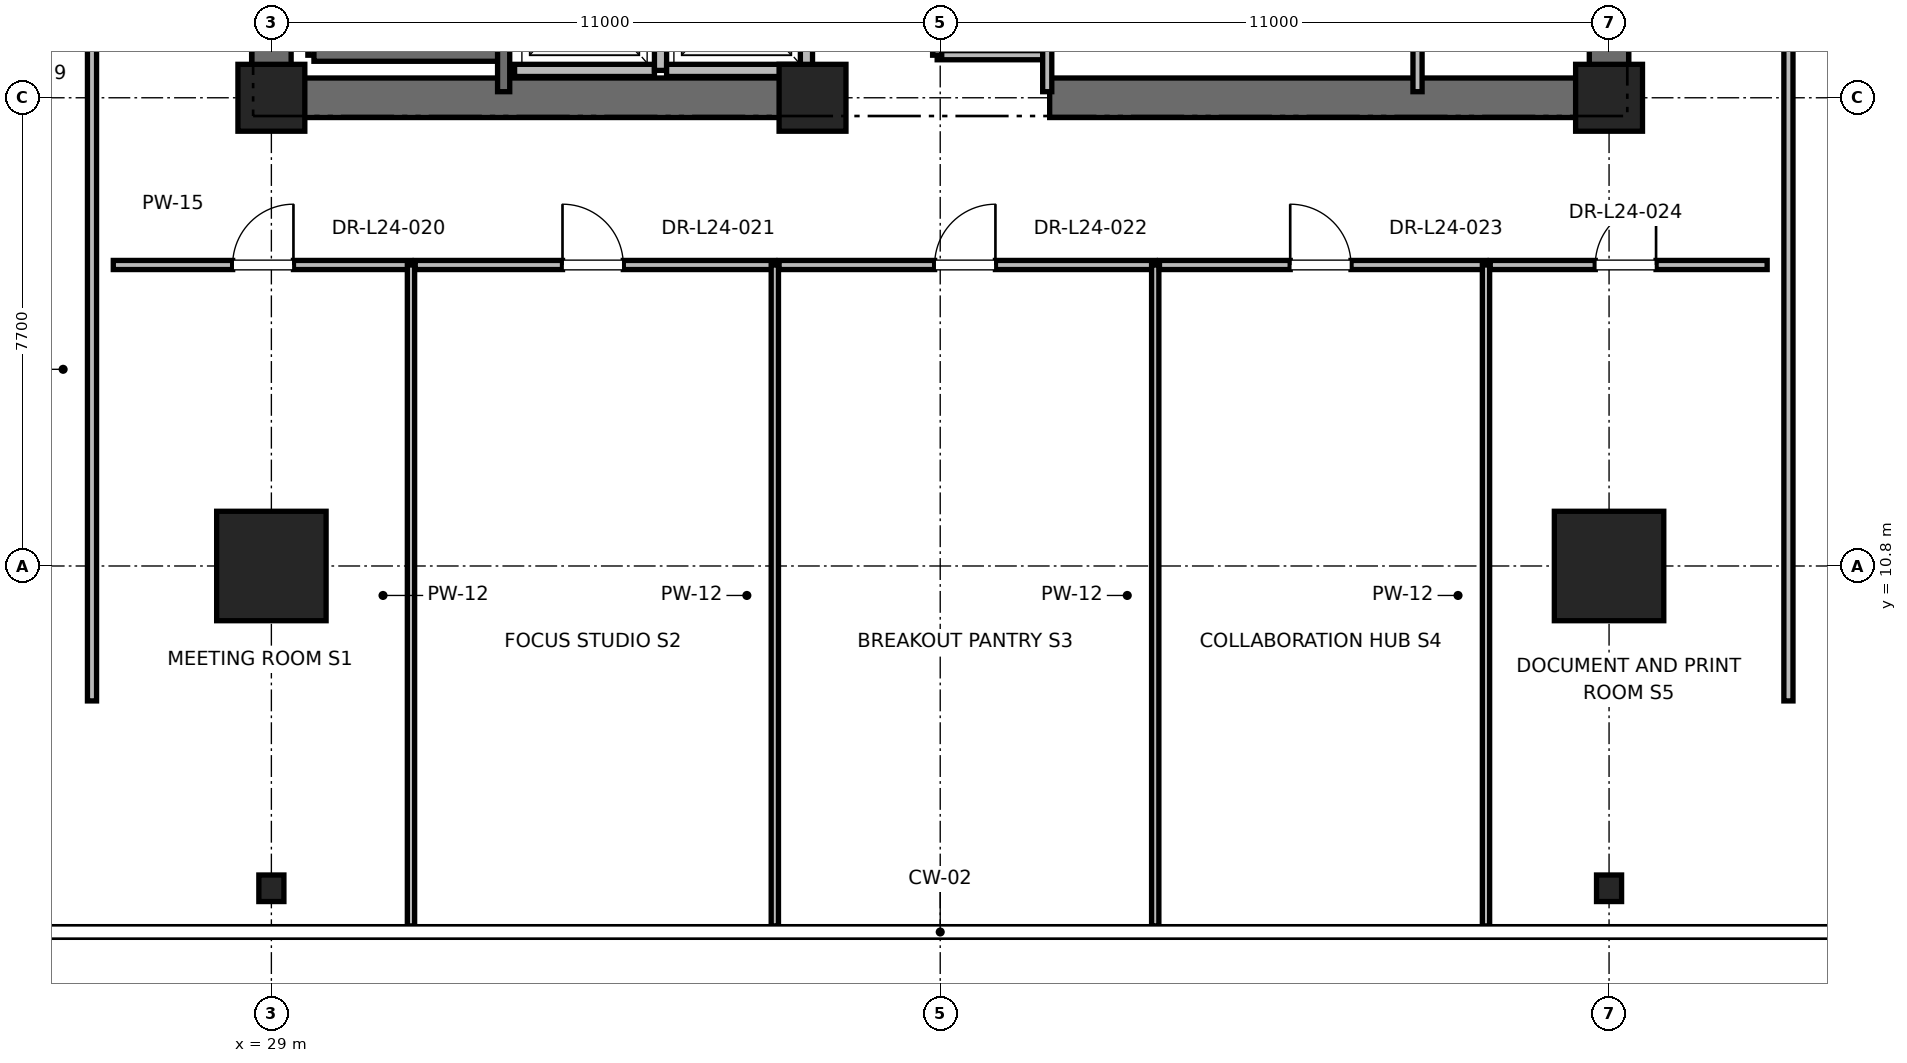
"""IFC4 building model, lengths in metres.
Left out: names, types, materials, properties, quantities, classifications, styles, units other than length and angle.
Written with IfcOpenShell. Run it as: python <this file> out.ifc"""

import sys

from ifc_helpers import new_model, si_unit, direction, frame, frame_2d, origin, origin_2d, place, context, subcontext, project, spatial, rectangle, i_section, extrude, element, fill, save


model = new_model("IFC4")
c1 = context("Model", 3, precision=1e-05, world=origin(), true_north=direction((0.0, 1.0)))
c2 = subcontext(c1, "Body", "Model", "MODEL_VIEW")
j1 = project(units=[si_unit("LENGTHUNIT", "METRE"), si_unit("PLANEANGLEUNIT", "RADIAN")], contexts=[c1])
p1 = place(None, origin())
s1 = spatial("IfcSite", under=j1, at=p1, CompositionType="ELEMENT")
p2 = place(p1, origin())
s2 = spatial("IfcBuilding", under=s1, at=p2, CompositionType="ELEMENT")
p3 = place(p2, frame((0.0, 0.0, 103.6)))
s3 = spatial("IfcBuildingStorey", under=s2, at=p3, CompositionType="ELEMENT", Elevation=103.6)
for number, where, z_axis, x_axis in (
    (1, (29.0, 10.8, 0.0), (0.0, 0.0, 1.0), (1.0, 0.0, 0.0)),
    (2, (51.0, 10.8, 0.0), (0.0, 0.0, 1.0), (1.0, 0.0, 0.0)),
):
    element("IfcColumn", number, at=place(p3, frame(where, z_axis=z_axis, x_axis=x_axis)), inside=s3, PredefinedType="COLUMN", context=c2, shape_type="SweptSolid", body=[
        extrude(rectangle(XDim=1.8, YDim=1.8, at=origin_2d()), origin(), (0.0, 0.0, 1.0), 4.0),
    ])
for number, where, z_axis, x_axis in (
    (3, (29.0, 5.5, 0.0), (0.0, 0.0, 1.0), (1.0, 0.0, 0.0)),
    (4, (51.0, 5.5, 0.0), (0.0, 0.0, 1.0), (1.0, 0.0, 0.0)),
):
    element("IfcColumn", number, at=place(p3, frame(where, z_axis=z_axis, x_axis=x_axis)), inside=s3, PredefinedType="COLUMN", context=c2, shape_type="SweptSolid", body=[
        extrude(i_section(OverallWidth=0.412, OverallDepth=0.437, WebThickness=0.036, FlangeThickness=0.058, FilletRadius=0.015, at=origin_2d()), origin(), (0.0, 0.0, 1.0), 4.0),
    ])
for number, where, z_axis, x_axis in (
    (5, (29.0, 18.5, 0.0), (0.0, 0.0, 1.0), (1.0, 0.0, 0.0)),
    (6, (51.0, 18.5, 0.0), (0.0, 0.0, 1.0), (1.0, 0.0, 0.0)),
    (7, (37.9, 18.5, 0.0), (0.0, 0.0, 1.0), (1.0, 0.0, 0.0)),
):
    element("IfcColumn", number, at=place(p3, frame(where, z_axis=z_axis, x_axis=x_axis)), inside=s3, PredefinedType="PILASTER", context=c2, shape_type="SweptSolid", body=[
        extrude(rectangle(XDim=1.1, YDim=1.1, at=origin_2d()), origin(), (0.0, 0.0, 1.0), 4.0),
    ])
for number, where, z_axis, x_axis in (
    (8, (29.0, 18.5, 0.0), (0.0, 0.0, 1.0), (1.0, 0.0, 0.0)),
    (9, (41.8, 18.5, 0.0), (0.0, 0.0, 1.0), (1.0, 0.0, 0.0)),
):
    element("IfcWall", number, at=place(p3, frame(where, z_axis=z_axis, x_axis=x_axis)), inside=s3, PredefinedType="SHEAR", context=c2, shape_type="SweptSolid", body=[
        extrude(rectangle(XDim=9.2, YDim=0.65, at=frame_2d((4.6, 0.0))), origin(), (0.0, 0.0, 1.0), 3.7),
    ])
p4 = place(p3, frame((29.0, 18.5, 0.0), z_axis=(0.0, 0.0, 1.0), x_axis=(0.0, 1.0, 0.0)))
e10 = element("IfcWall", 10, at=p4, inside=s3, PredefinedType="SHEAR", context=c2, shape_type="SweptSolid", body=[
    extrude(rectangle(XDim=8.8, YDim=0.65, at=frame_2d((4.4, 0.0))), origin(), (0.0, 0.0, 1.0), 3.7),
])
p5 = place(p3, frame((51.0, 18.5, 0.0), z_axis=(0.0, 0.0, 1.0), x_axis=(0.0, 1.0, 0.0)))
e11 = element("IfcWall", 11, at=p5, inside=s3, PredefinedType="SHEAR", context=c2, shape_type="SweptSolid", body=[
    extrude(rectangle(XDim=5.8, YDim=0.65, at=frame_2d((2.9, 0.0))), origin(), (0.0, 0.0, 1.0), 3.7),
])
p6 = place(p3, frame((29.7, 19.2, 0.0), z_axis=(0.0, 0.0, 1.0), x_axis=(0.0, 1.0, 0.0)))
e12 = element("IfcWall", 12, at=p6, inside=s3, PredefinedType="SOLIDWALL", context=c2, shape_type="SweptSolid", body=[
    extrude(rectangle(XDim=8.15, YDim=0.2, at=frame_2d((4.075, 0.0))), origin(), (0.0, 0.0, 1.0), 3.7),
])
p7 = place(p3, frame((29.7, 19.2, 0.0), z_axis=(0.0, 0.0, 1.0), x_axis=(1.0, 0.0, 0.0)))
e13 = element("IfcWall", 13, at=p7, inside=s3, PredefinedType="SOLIDWALL", context=c2, shape_type="SweptSolid", body=[
    extrude(rectangle(XDim=3.12, YDim=0.2, at=frame_2d((1.56, 0.0))), origin(), (0.0, 0.0, 1.0), 3.7),
])
p8 = place(p3, frame((32.82, 18.6, 0.0), z_axis=(0.0, 0.0, 1.0), x_axis=(0.0, 1.0, 0.0)))
e14 = element("IfcWall", 14, at=p8, inside=s3, PredefinedType="SOLIDWALL", context=c2, shape_type="SweptSolid", body=[
    extrude(rectangle(XDim=8.78, YDim=0.2, at=frame_2d((4.39, 0.0))), origin(), (0.0, 0.0, 1.0), 3.7),
])
p9 = place(p3, frame((33.0, 18.95, 0.0), z_axis=(0.0, 0.0, 1.0), x_axis=(1.0, 0.0, 0.0)))
e15 = element("IfcWall", 15, at=p9, inside=s3, PredefinedType="SOLIDWALL", context=c2, shape_type="SweptSolid", body=[
    extrude(rectangle(XDim=2.3, YDim=0.2, at=frame_2d((1.15, 0.0))), origin(), (0.0, 0.0, 1.0), 3.7),
])
p10 = place(p3, frame((35.4, 18.95, 0.0), z_axis=(0.0, 0.0, 1.0), x_axis=(0.0, 1.0, 0.0)))
e16 = element("IfcWall", 16, at=p10, inside=s3, PredefinedType="SOLIDWALL", context=c2, shape_type="SweptSolid", body=[
    extrude(rectangle(XDim=2.6, YDim=0.2, at=frame_2d((1.3, 0.0))), origin(), (0.0, 0.0, 1.0), 3.7),
])
p11 = place(p3, frame((35.5, 18.95, 0.0), z_axis=(0.0, 0.0, 1.0), x_axis=(1.0, 0.0, 0.0)))
e17 = element("IfcWall", 17, at=p11, inside=s3, PredefinedType="SOLIDWALL", context=c2, shape_type="SweptSolid", body=[
    extrude(rectangle(XDim=2.3, YDim=0.2, at=frame_2d((1.15, 0.0))), origin(), (0.0, 0.0, 1.0), 2.48),
])
p12 = place(p3, frame((37.8, 18.95, 0.0), z_axis=(0.0, 0.0, 1.0), x_axis=(0.0, 1.0, 0.0)))
e18 = element("IfcWall", 18, at=p12, inside=s3, PredefinedType="SOLIDWALL", context=c2, shape_type="SweptSolid", body=[
    extrude(rectangle(XDim=2.6, YDim=0.2, at=frame_2d((1.3, 0.0))), origin(), (0.0, 0.0, 1.0), 2.48),
])
p13 = place(p3, frame((39.95, 19.2, 0.0), z_axis=(0.0, 0.0, 1.0), x_axis=(1.0, 0.0, 0.0)))
e19 = element("IfcWall", 19, at=p13, inside=s3, PredefinedType="PARTITIONING", context=c2, shape_type="SweptSolid", body=[
    extrude(rectangle(XDim=1.81, YDim=0.15, at=frame_2d((0.905, 0.0))), origin(), (0.0, 0.0, 1.0), 2.85),
])
p14 = place(p3, frame((41.76, 18.6, 0.0), z_axis=(0.0, 0.0, 1.0), x_axis=(0.0, 1.0, 0.0)))
e20 = element("IfcWall", 20, at=p14, inside=s3, PredefinedType="PARTITIONING", context=c2, shape_type="SweptSolid", body=[
    extrude(rectangle(XDim=3.6, YDim=0.15, at=frame_2d((1.8, 0.0))), origin(), (0.0, 0.0, 1.0), 2.48),
])
p15 = place(p3, frame((39.95, 19.2, 0.0), z_axis=(0.0, 0.0, 1.0), x_axis=(0.0, 1.0, 0.0)))
e21 = element("IfcWall", 21, at=p15, inside=s3, PredefinedType="PARTITIONING", context=c2, shape_type="SweptSolid", body=[
    extrude(rectangle(XDim=3.0, YDim=0.15, at=frame_2d((1.5, 0.0))), origin(), (0.0, 0.0, 1.0), 2.85),
])
p16 = place(p15, frame((1.05, 0.0, 0.0)))
e22 = element("IfcOpeningElement", 22, at=p16, cuts=e21, PredefinedType="OPENING", context=c2, shape_type="SweptSolid", body=[
    extrude(rectangle(XDim=0.9, YDim=2.1, at=frame_2d((0.45, 1.05))), frame((0.0, 0.075, 0.0), z_axis=(0.0, -1.0, 0.0), x_axis=(1.0, 0.0, 0.0)), (0.0, 0.0, 1.0), 0.15),
])
p17 = place(p3, frame((47.85, 18.6, 0.0), z_axis=(0.0, 0.0, 1.0), x_axis=(0.0, 1.0, 0.0)))
e23 = element("IfcWall", 23, at=p17, inside=s3, PredefinedType="PARTITIONING", context=c2, shape_type="SweptSolid", body=[
    extrude(rectangle(XDim=2.54, YDim=0.15, at=frame_2d((1.27, 0.0))), origin(), (0.0, 0.0, 1.0), 2.85),
])
p18 = place(p3, frame((26.4, 15.75, 0.0), z_axis=(0.0, 0.0, 1.0), x_axis=(1.0, 0.0, 0.0)))
e24 = element("IfcWall", 24, at=p18, inside=s3, PredefinedType="PARTITIONING", context=c2, shape_type="SweptSolid", body=[
    extrude(rectangle(XDim=4.896, YDim=0.15, at=frame_2d((2.448, 0.0))), origin(), (0.0, 0.0, 1.0), 2.753),
])
p19 = place(p18, frame((1.963, 0.0, 0.0)))
e25 = element("IfcOpeningElement", 25, at=p19, cuts=e24, PredefinedType="OPENING", context=c2, shape_type="SweptSolid", body=[
    extrude(rectangle(XDim=1.0, YDim=2.15, at=frame_2d((0.5, 1.075))), frame((0.0, 0.075, 0.0), z_axis=(0.0, -1.0, 0.0), x_axis=(1.0, 0.0, 0.0)), (0.0, 0.0, 1.0), 0.15),
])
p20 = place(p3, frame((31.296, 4.881, 0.0), z_axis=(0.0, 0.0, 1.0), x_axis=(0.0, 1.0, 0.0)))
e26 = element("IfcWall", 26, at=p20, inside=s3, PredefinedType="PARTITIONING", context=c2, shape_type="SweptSolid", body=[
    extrude(rectangle(XDim=10.869, YDim=0.12, at=frame_2d((5.435, 0.0))), origin(), (0.0, 0.0, 1.0), 2.33),
])
p21 = place(p3, frame((31.366, 15.75, 0.0), z_axis=(0.0, 0.0, 1.0), x_axis=(1.0, 0.0, 0.0)))
e27 = element("IfcWall", 27, at=p21, inside=s3, PredefinedType="PARTITIONING", context=c2, shape_type="SweptSolid", body=[
    extrude(rectangle(XDim=5.914, YDim=0.15, at=frame_2d((2.957, 0.0))), origin(), (0.0, 0.0, 1.0), 2.85),
])
p22 = place(p21, frame((2.422, 0.0, 0.0)))
e28 = element("IfcOpeningElement", 28, at=p22, cuts=e27, PredefinedType="OPENING", context=c2, shape_type="SweptSolid", body=[
    extrude(rectangle(XDim=1.0, YDim=2.15, at=frame_2d((0.5, 1.075))), frame((0.0, 0.075, 0.0), z_axis=(0.0, -1.0, 0.0), x_axis=(1.0, 0.0, 0.0)), (0.0, 0.0, 1.0), 0.15),
])
p23 = place(p3, frame((37.28, 4.881, 0.0), z_axis=(0.0, 0.0, 1.0), x_axis=(0.0, 1.0, 0.0)))
e29 = element("IfcWall", 29, at=p23, inside=s3, PredefinedType="PARTITIONING", context=c2, shape_type="SweptSolid", body=[
    extrude(rectangle(XDim=10.869, YDim=0.12, at=frame_2d((5.435, 0.0))), origin(), (0.0, 0.0, 1.0), 2.33),
])
p24 = place(p3, frame((37.35, 15.75, 0.0), z_axis=(0.0, 0.0, 1.0), x_axis=(1.0, 0.0, 0.0)))
e30 = element("IfcWall", 30, at=p24, inside=s3, PredefinedType="PARTITIONING", context=c2, shape_type="SweptSolid", body=[
    extrude(rectangle(XDim=6.186, YDim=0.15, at=frame_2d((3.093, 0.0))), origin(), (0.0, 0.0, 1.0), 2.85),
])
p25 = place(p24, frame((2.558, 0.0, 0.0)))
e31 = element("IfcOpeningElement", 31, at=p25, cuts=e30, PredefinedType="OPENING", context=c2, shape_type="SweptSolid", body=[
    extrude(rectangle(XDim=1.0, YDim=2.15, at=frame_2d((0.5, 1.075))), frame((0.0, 0.075, 0.0), z_axis=(0.0, -1.0, 0.0), x_axis=(1.0, 0.0, 0.0)), (0.0, 0.0, 1.0), 0.15),
])
p26 = place(p3, frame((43.536, 4.881, 0.0), z_axis=(0.0, 0.0, 1.0), x_axis=(0.0, 1.0, 0.0)))
e32 = element("IfcWall", 32, at=p26, inside=s3, PredefinedType="PARTITIONING", context=c2, shape_type="SweptSolid", body=[
    extrude(rectangle(XDim=10.869, YDim=0.12, at=frame_2d((5.435, 0.0))), origin(), (0.0, 0.0, 1.0), 2.33),
])
p27 = place(p3, frame((43.606, 15.75, 0.0), z_axis=(0.0, 0.0, 1.0), x_axis=(1.0, 0.0, 0.0)))
e33 = element("IfcWall", 33, at=p27, inside=s3, PredefinedType="PARTITIONING", context=c2, shape_type="SweptSolid", body=[
    extrude(rectangle(XDim=5.37, YDim=0.15, at=frame_2d((2.685, 0.0))), origin(), (0.0, 0.0, 1.0), 2.85),
])
p28 = place(p27, frame((2.15, 0.0, 0.0)))
e34 = element("IfcOpeningElement", 34, at=p28, cuts=e33, PredefinedType="OPENING", context=c2, shape_type="SweptSolid", body=[
    extrude(rectangle(XDim=1.0, YDim=2.15, at=frame_2d((0.5, 1.075))), frame((0.0, 0.075, 0.0), z_axis=(0.0, -1.0, 0.0), x_axis=(1.0, 0.0, 0.0)), (0.0, 0.0, 1.0), 0.15),
])
p29 = place(p3, frame((48.976, 4.881, 0.0), z_axis=(0.0, 0.0, 1.0), x_axis=(0.0, 1.0, 0.0)))
e35 = element("IfcWall", 35, at=p29, inside=s3, PredefinedType="PARTITIONING", context=c2, shape_type="SweptSolid", body=[
    extrude(rectangle(XDim=10.869, YDim=0.12, at=frame_2d((5.435, 0.0))), origin(), (0.0, 0.0, 1.0), 2.33),
])
p30 = place(p3, frame((49.046, 15.75, 0.0), z_axis=(0.0, 0.0, 1.0), x_axis=(1.0, 0.0, 0.0)))
e36 = element("IfcWall", 36, at=p30, inside=s3, PredefinedType="PARTITIONING", context=c2, shape_type="SweptSolid", body=[
    extrude(rectangle(XDim=4.554, YDim=0.15, at=frame_2d((2.277, 0.0))), origin(), (0.0, 0.0, 1.0), 2.753),
])
p31 = place(p30, frame((1.727, 0.0, 0.0)))
e37 = element("IfcOpeningElement", 37, at=p31, cuts=e36, PredefinedType="OPENING", context=c2, shape_type="SweptSolid", body=[
    extrude(rectangle(XDim=1.0, YDim=2.15, at=frame_2d((0.5, 1.075))), frame((0.0, 0.075, 0.0), z_axis=(0.0, -1.0, 0.0), x_axis=(1.0, 0.0, 0.0)), (0.0, 0.0, 1.0), 0.15),
])
p32 = place(p3, frame((26.05, 8.581, 0.0), z_axis=(0.0, 0.0, 1.0), x_axis=(0.0, 1.0, 0.0)))
e38 = element("IfcWall", 38, at=p32, inside=s3, PredefinedType="PARTITIONING", context=c2, shape_type="SweptSolid", body=[
    extrude(rectangle(XDim=12.865, YDim=0.15, at=frame_2d((6.432, 0.0))), origin(), (0.0, 0.0, 1.0), 2.753),
])
p33 = place(p32, frame((10.907, 0.0, 0.0)))
e39 = element("IfcOpeningElement", 39, at=p33, cuts=e38, PredefinedType="OPENING", context=c2, shape_type="SweptSolid", body=[
    extrude(rectangle(XDim=1.0, YDim=2.15, at=frame_2d((0.5, 1.075))), frame((0.0, 0.075, 0.0), z_axis=(0.0, -1.0, 0.0), x_axis=(1.0, 0.0, 0.0)), (0.0, 0.0, 1.0), 0.15),
])
p34 = place(p3, frame((53.95, 8.581, 0.0), z_axis=(0.0, 0.0, 1.0), x_axis=(0.0, 1.0, 0.0)))
e40 = element("IfcWall", 40, at=p34, inside=s3, PredefinedType="PARTITIONING", context=c2, shape_type="SweptSolid", body=[
    extrude(rectangle(XDim=15.892, YDim=0.15, at=frame_2d((7.946, 0.0))), origin(), (0.0, 0.0, 1.0), 2.753),
])
p35 = place(p34, frame((12.42, 0.0, 0.0)))
e41 = element("IfcOpeningElement", 41, at=p35, cuts=e40, PredefinedType="OPENING", context=c2, shape_type="SweptSolid", body=[
    extrude(rectangle(XDim=1.0, YDim=2.15, at=frame_2d((0.5, 1.075))), frame((0.0, 0.075, 0.0), z_axis=(0.0, -1.0, 0.0), x_axis=(1.0, 0.0, 0.0)), (0.0, 0.0, 1.0), 0.15),
])
p36 = place(p19, origin())
e42 = element("IfcDoor", 42, at=p36, inside=s3, OperationType="SINGLE_SWING_RIGHT", PredefinedType="DOOR", context=c2, shape_type="SweptSolid", body=[
    extrude(rectangle(XDim=1.0, YDim=2.15, at=frame_2d((0.5, 1.075))), frame((0.0, 0.025, 0.0), z_axis=(0.0, -1.0, 0.0), x_axis=(1.0, 0.0, 0.0)), (0.0, 0.0, 1.0), 0.05),
])
fill(e25, e42)
p37 = place(p22, origin())
e43 = element("IfcDoor", 43, at=p37, inside=s3, OperationType="SINGLE_SWING_LEFT", PredefinedType="DOOR", context=c2, shape_type="SweptSolid", body=[
    extrude(rectangle(XDim=1.0, YDim=2.15, at=frame_2d((0.5, 1.075))), frame((0.0, 0.025, 0.0), z_axis=(0.0, -1.0, 0.0), x_axis=(1.0, 0.0, 0.0)), (0.0, 0.0, 1.0), 0.05),
])
fill(e28, e43)
p38 = place(p25, origin())
e44 = element("IfcDoor", 44, at=p38, inside=s3, OperationType="SINGLE_SWING_RIGHT", PredefinedType="DOOR", context=c2, shape_type="SweptSolid", body=[
    extrude(rectangle(XDim=1.0, YDim=2.15, at=frame_2d((0.5, 1.075))), frame((0.0, 0.025, 0.0), z_axis=(0.0, -1.0, 0.0), x_axis=(1.0, 0.0, 0.0)), (0.0, 0.0, 1.0), 0.05),
])
fill(e31, e44)
p39 = place(p28, origin())
e45 = element("IfcDoor", 45, at=p39, inside=s3, OperationType="SINGLE_SWING_LEFT", PredefinedType="DOOR", context=c2, shape_type="SweptSolid", body=[
    extrude(rectangle(XDim=1.0, YDim=2.15, at=frame_2d((0.5, 1.075))), frame((0.0, 0.025, 0.0), z_axis=(0.0, -1.0, 0.0), x_axis=(1.0, 0.0, 0.0)), (0.0, 0.0, 1.0), 0.05),
])
fill(e34, e45)
p40 = place(p31, origin())
e46 = element("IfcDoor", 46, at=p40, inside=s3, OperationType="SINGLE_SWING_RIGHT", PredefinedType="DOOR", context=c2, shape_type="SweptSolid", body=[
    extrude(rectangle(XDim=1.0, YDim=2.15, at=frame_2d((0.5, 1.075))), frame((0.0, 0.025, 0.0), z_axis=(0.0, -1.0, 0.0), x_axis=(1.0, 0.0, 0.0)), (0.0, 0.0, 1.0), 0.05),
])
fill(e37, e46)
save(model, sys.argv[1])
